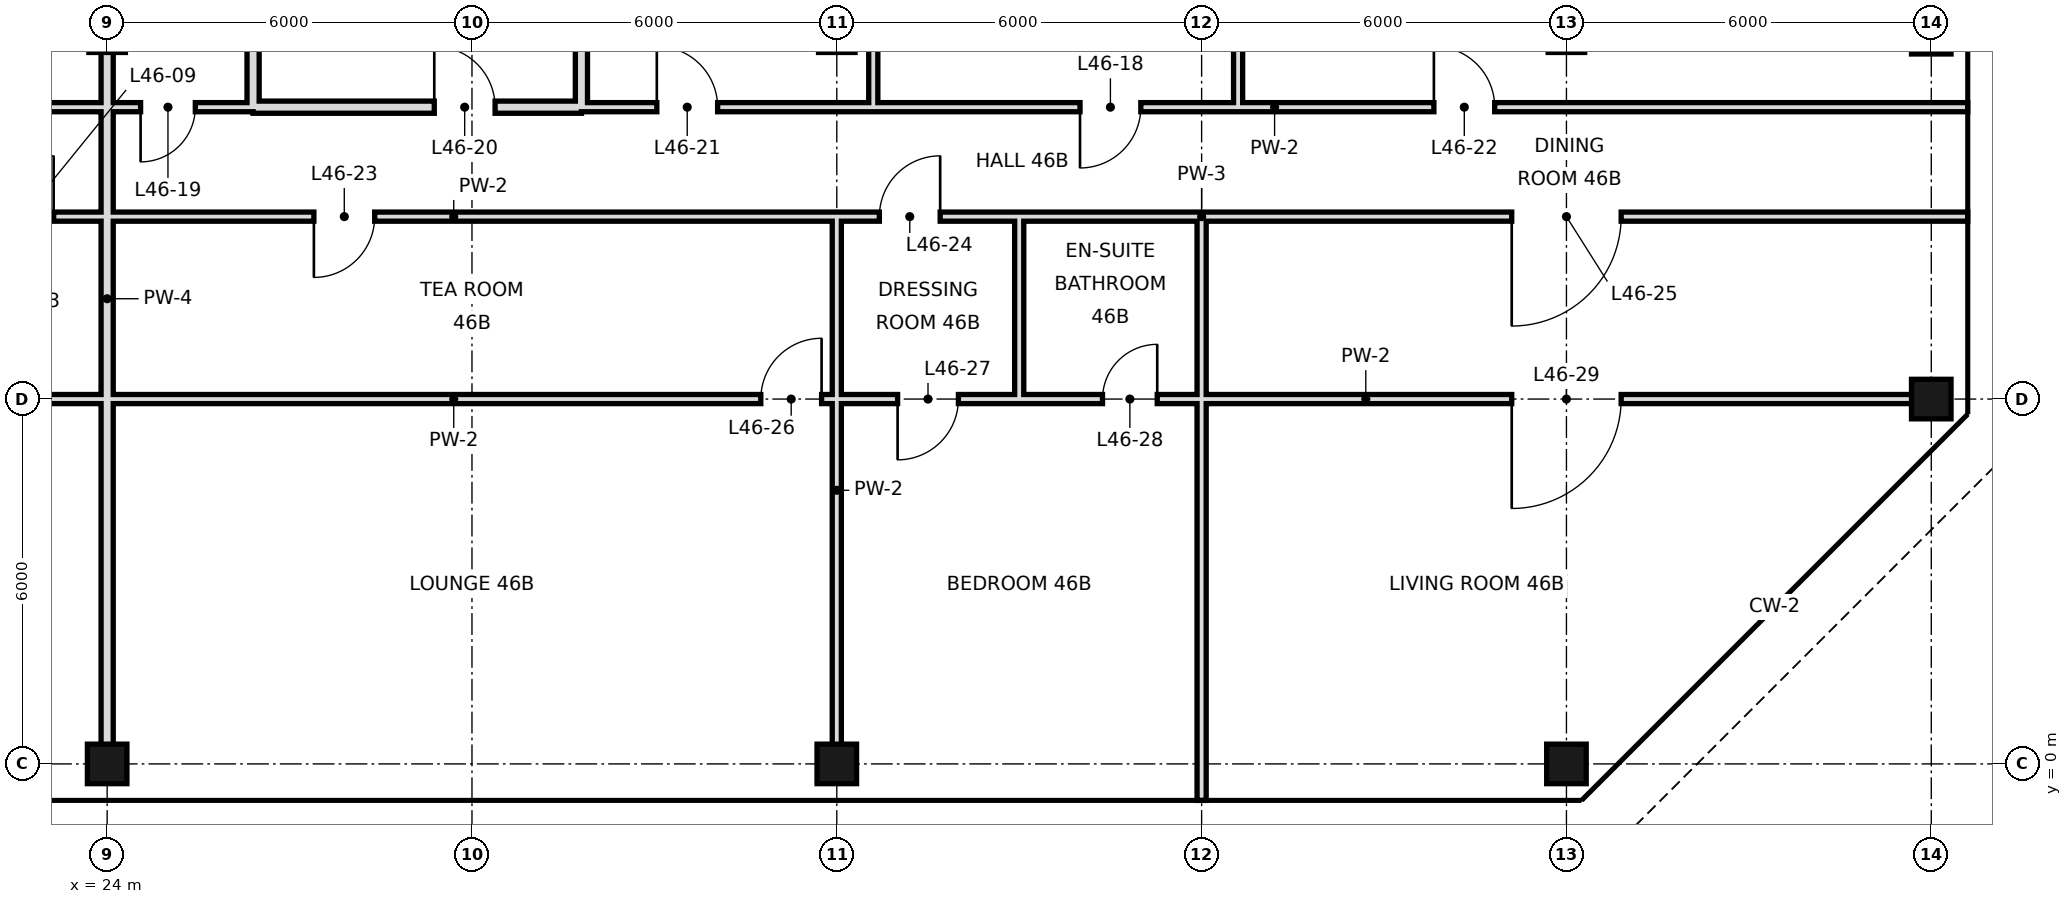
"""IFC4 building model, lengths in metres.
Left out: names, types, materials, properties, quantities, classifications, styles, units other than length and angle.
Written with IfcOpenShell. Run it as: python <this file> out.ifc"""

import sys

from ifc_helpers import new_model, si_unit, direction, frame, frame_2d, origin, origin_2d, place, context, subcontext, project, spatial, rectangle, hollow_rectangle, extrude, element, fill, save


model = new_model("IFC4")
c1 = context("Model", 3, precision=1e-05, world=origin(), true_north=direction((0.0, 1.0)))
c2 = subcontext(c1, "Body", "Model", "MODEL_VIEW")
j1 = project(units=[si_unit("LENGTHUNIT", "METRE"), si_unit("PLANEANGLEUNIT", "RADIAN")], contexts=[c1])
p1 = place(None, origin())
s1 = spatial("IfcSite", under=j1, at=p1, CompositionType="ELEMENT")
p2 = place(p1, origin())
s2 = spatial("IfcBuilding", under=s1, at=p2, CompositionType="ELEMENT")
p3 = place(p2, frame((0.0, 0.0, 199.2)))
s3 = spatial("IfcBuildingStorey", under=s2, at=p3, CompositionType="ELEMENT", Elevation=199.2)
for number, where, z_axis, x_axis in (
    (1, (24.0, 0.0, 0.0), (0.0, 0.0, 1.0), (1.0, 0.0, 0.0)),
    (2, (36.0, 0.0, 0.0), (0.0, 0.0, 1.0), (1.0, 0.0, 0.0)),
    (3, (48.0, 0.0, 0.0), (0.0, 0.0, 1.0), (1.0, 0.0, 0.0)),
    (4, (54.0, 6.0, 0.0), (0.0, 0.0, 1.0), (1.0, 0.0, 0.0)),
    (5, (54.0, 12.0, 0.0), (0.0, 0.0, 1.0), (1.0, 0.0, 0.0)),
):
    element("IfcColumn", number, at=place(p3, frame(where, z_axis=z_axis, x_axis=x_axis)), inside=s3, PredefinedType="COLUMN", context=c2, shape_type="SweptSolid", body=[
        extrude(hollow_rectangle(XDim=0.65, YDim=0.65, WallThickness=0.032, at=origin_2d()), origin(), (0.0, 0.0, 1.0), 3.6),
    ])
p4 = place(p3, frame((24.0, 0.0, 0.0), z_axis=(0.0, 0.0, 1.0), x_axis=(0.0, 1.0, 0.0)))
e6 = element("IfcWall", 6, at=p4, inside=s3, PredefinedType="SOLIDWALL", context=c2, shape_type="SweptSolid", body=[
    extrude(rectangle(XDim=15.3, YDim=0.2, at=frame_2d((7.65, 0.0))), origin(), (0.0, 0.0, 1.0), 2.72),
])
p5 = place(p3, frame((26.4, 10.8, 0.0), z_axis=(0.0, 0.0, 1.0), x_axis=(0.0, 1.0, 0.0)))
e7 = element("IfcWall", 7, at=p5, inside=s3, PredefinedType="SOLIDWALL", context=c2, shape_type="SweptSolid", body=[
    extrude(rectangle(XDim=4.5, YDim=0.2, at=frame_2d((2.25, 0.0))), origin(), (0.0, 0.0, 1.0), 2.72),
])
p6 = place(p3, frame((31.8, 10.8, 0.0), z_axis=(0.0, 0.0, 1.0), x_axis=(0.0, 1.0, 0.0)))
e8 = element("IfcWall", 8, at=p6, inside=s3, PredefinedType="SOLIDWALL", context=c2, shape_type="SweptSolid", body=[
    extrude(rectangle(XDim=4.5, YDim=0.2, at=frame_2d((2.25, 0.0))), origin(), (0.0, 0.0, 1.0), 3.42),
])
p7 = place(p3, frame((36.0, 0.0, 0.0), z_axis=(0.0, 0.0, 1.0), x_axis=(0.0, 1.0, 0.0)))
e9 = element("IfcWall", 9, at=p7, inside=s3, PredefinedType="PARTITIONING", context=c2, shape_type="SweptSolid", body=[
    extrude(rectangle(XDim=9.0, YDim=0.15, at=frame_2d((4.5, 0.0))), origin(), (0.0, 0.0, 1.0), 2.72),
])
p8 = place(p3, frame((36.6, 10.8, 0.0), z_axis=(0.0, 0.0, 1.0), x_axis=(0.0, 1.0, 0.0)))
e10 = element("IfcWall", 10, at=p8, inside=s3, PredefinedType="PARTITIONING", context=c2, shape_type="SweptSolid", body=[
    extrude(rectangle(XDim=4.5, YDim=0.15, at=frame_2d((2.25, 0.0))), origin(), (0.0, 0.0, 1.0), 3.42),
])
p9 = place(p3, frame((39.0, 6.0, 0.0), z_axis=(0.0, 0.0, 1.0), x_axis=(0.0, 1.0, 0.0)))
e11 = element("IfcWall", 11, at=p9, inside=s3, PredefinedType="PARTITIONING", context=c2, shape_type="SweptSolid", body=[
    extrude(rectangle(XDim=3.0, YDim=0.15, at=frame_2d((1.5, 0.0))), origin(), (0.0, 0.0, 1.0), 3.42),
])
p10 = place(p3, frame((42.0, -0.6, 0.0), z_axis=(0.0, 0.0, 1.0), x_axis=(0.0, 1.0, 0.0)))
e12 = element("IfcWall", 12, at=p10, inside=s3, PredefinedType="PARTITIONING", context=c2, shape_type="SweptSolid", body=[
    extrude(rectangle(XDim=6.6, YDim=0.15, at=frame_2d((3.3, 0.0))), origin(), (0.0, 0.0, 1.0), 2.72),
])
p11 = place(p3, frame((42.0, 6.0, 0.0), z_axis=(0.0, 0.0, 1.0), x_axis=(0.0, 1.0, 0.0)))
e13 = element("IfcWall", 13, at=p11, inside=s3, PredefinedType="PARTITIONING", context=c2, shape_type="SweptSolid", body=[
    extrude(rectangle(XDim=3.0, YDim=0.15, at=frame_2d((1.5, 0.0))), origin(), (0.0, 0.0, 1.0), 2.72),
])
p12 = place(p3, frame((42.6, 10.8, 0.0), z_axis=(0.0, 0.0, 1.0), x_axis=(0.0, 1.0, 0.0)))
e14 = element("IfcWall", 14, at=p12, inside=s3, PredefinedType="PARTITIONING", context=c2, shape_type="SweptSolid", body=[
    extrude(rectangle(XDim=4.5, YDim=0.15, at=frame_2d((2.25, 0.0))), origin(), (0.0, 0.0, 1.0), 3.42),
])
p13 = place(p3, frame((26.4, 10.8, 0.0), z_axis=(0.0, 0.0, 1.0), x_axis=(1.0, 0.0, 0.0)))
e15 = element("IfcWall", 15, at=p13, inside=s3, PredefinedType="SOLIDWALL", context=c2, shape_type="SweptSolid", body=[
    extrude(rectangle(XDim=5.4, YDim=0.2, at=frame_2d((2.7, 0.0))), origin(), (0.0, 0.0, 1.0), 2.72),
])
p14 = place(p13, frame((2.98, 0.0, 0.0)))
e16 = element("IfcOpeningElement", 16, at=p14, cuts=e15, PredefinedType="OPENING", context=c2, shape_type="SweptSolid", body=[
    extrude(rectangle(XDim=1.0, YDim=2.4, at=frame_2d((0.5, 1.2))), frame((0.0, 0.11, 0.0), z_axis=(0.0, -1.0, 0.0), x_axis=(1.0, 0.0, 0.0)), (0.0, 0.0, 1.0), 0.22),
])
p15 = place(p3, frame((19.2, 10.8, 0.0), z_axis=(0.0, 0.0, 1.0), x_axis=(1.0, 0.0, 0.0)))
e17 = element("IfcWall", 17, at=p15, inside=s3, PredefinedType="PARTITIONING", context=c2, shape_type="SweptSolid", body=[
    extrude(rectangle(XDim=4.8, YDim=0.15, at=frame_2d((2.4, 0.0))), origin(), (0.0, 0.0, 1.0), 3.42),
])
p16 = place(p15, frame((2.56, 0.0, 0.0)))
e18 = element("IfcOpeningElement", 18, at=p16, cuts=e17, PredefinedType="OPENING", context=c2, shape_type="SweptSolid", body=[
    extrude(rectangle(XDim=1.0, YDim=2.4, at=frame_2d((0.5, 1.2))), frame((0.0, 0.085, 0.0), z_axis=(0.0, -1.0, 0.0), x_axis=(1.0, 0.0, 0.0)), (0.0, 0.0, 1.0), 0.17),
])
p17 = place(p3, frame((31.8, 10.8, 0.0), z_axis=(0.0, 0.0, 1.0), x_axis=(1.0, 0.0, 0.0)))
e19 = element("IfcWall", 19, at=p17, inside=s3, PredefinedType="PARTITIONING", context=c2, shape_type="SweptSolid", body=[
    extrude(rectangle(XDim=22.8, YDim=0.15, at=frame_2d((11.4, 0.0))), origin(), (0.0, 0.0, 1.0), 3.42),
])
p18 = place(p17, frame((8.2, 0.0, 0.0)))
e20 = element("IfcOpeningElement", 20, at=p18, cuts=e19, PredefinedType="OPENING", context=c2, shape_type="SweptSolid", body=[
    extrude(rectangle(XDim=1.0, YDim=2.4, at=frame_2d((0.5, 1.2))), frame((0.0, 0.085, 0.0), z_axis=(0.0, -1.0, 0.0), x_axis=(1.0, 0.0, 0.0)), (0.0, 0.0, 1.0), 0.17),
])
p19 = place(p17, frame((1.24, 0.0, 0.0)))
e21 = element("IfcOpeningElement", 21, at=p19, cuts=e19, PredefinedType="OPENING", context=c2, shape_type="SweptSolid", body=[
    extrude(rectangle(XDim=1.0, YDim=2.4, at=frame_2d((0.5, 1.2))), frame((0.0, 0.085, 0.0), z_axis=(0.0, -1.0, 0.0), x_axis=(1.0, 0.0, 0.0)), (0.0, 0.0, 1.0), 0.17),
])
p20 = place(p17, frame((14.02, 0.0, 0.0)))
e22 = element("IfcOpeningElement", 22, at=p20, cuts=e19, PredefinedType="OPENING", context=c2, shape_type="SweptSolid", body=[
    extrude(rectangle(XDim=1.0, YDim=2.4, at=frame_2d((0.5, 1.2))), frame((0.0, 0.085, 0.0), z_axis=(0.0, -1.0, 0.0), x_axis=(1.0, 0.0, 0.0)), (0.0, 0.0, 1.0), 0.17),
])
p21 = place(p3, frame((24.0, 10.8, 0.0), z_axis=(0.0, 0.0, 1.0), x_axis=(1.0, 0.0, 0.0)))
e23 = element("IfcWall", 23, at=p21, inside=s3, PredefinedType="PARTITIONING", context=c2, shape_type="SweptSolid", body=[
    extrude(rectangle(XDim=2.4, YDim=0.15, at=frame_2d((1.2, 0.0))), origin(), (0.0, 0.0, 1.0), 3.42),
])
p22 = place(p21, frame((0.55, 0.0, 0.0)))
e24 = element("IfcOpeningElement", 24, at=p22, cuts=e23, PredefinedType="OPENING", context=c2, shape_type="SweptSolid", body=[
    extrude(rectangle(XDim=0.9, YDim=2.4, at=frame_2d((0.45, 1.2))), frame((0.0, 0.085, 0.0), z_axis=(0.0, -1.0, 0.0), x_axis=(1.0, 0.0, 0.0)), (0.0, 0.0, 1.0), 0.17),
])
p23 = place(p3, frame((20.4, 6.0, 0.0), z_axis=(0.0, 0.0, 1.0), x_axis=(1.0, 0.0, 0.0)))
e25 = element("IfcWall", 25, at=p23, inside=s3, PredefinedType="PARTITIONING", context=c2, shape_type="SweptSolid", body=[
    extrude(rectangle(XDim=18.6, YDim=0.15, at=frame_2d((9.3, 0.0))), origin(), (0.0, 0.0, 1.0), 2.97),
])
p24 = place(p23, frame((0.25, 0.0, 0.0)))
e26 = element("IfcOpeningElement", 26, at=p24, cuts=e25, PredefinedType="OPENING", context=c2, shape_type="SweptSolid", body=[
    extrude(rectangle(XDim=1.0, YDim=2.4, at=frame_2d((0.5, 1.2))), frame((0.0, 0.085, 0.0), z_axis=(0.0, -1.0, 0.0), x_axis=(1.0, 0.0, 0.0)), (0.0, 0.0, 1.0), 0.17),
])
p25 = place(p23, frame((14.35, 0.0, 0.0)))
e27 = element("IfcOpeningElement", 27, at=p25, cuts=e25, PredefinedType="OPENING", context=c2, shape_type="SweptSolid", body=[
    extrude(rectangle(XDim=1.0, YDim=2.4, at=frame_2d((0.5, 1.2))), frame((0.0, 0.085, 0.0), z_axis=(0.0, -1.0, 0.0), x_axis=(1.0, 0.0, 0.0)), (0.0, 0.0, 1.0), 0.17),
])
p26 = place(p23, frame((16.6, 0.0, 0.0)))
e28 = element("IfcOpeningElement", 28, at=p26, cuts=e25, PredefinedType="OPENING", context=c2, shape_type="SweptSolid", body=[
    extrude(rectangle(XDim=1.0, YDim=2.4, at=frame_2d((0.5, 1.2))), frame((0.0, 0.085, 0.0), z_axis=(0.0, -1.0, 0.0), x_axis=(1.0, 0.0, 0.0)), (0.0, 0.0, 1.0), 0.17),
])
p27 = place(p3, frame((42.0, 6.0, 0.0), z_axis=(0.0, 0.0, 1.0), x_axis=(1.0, 0.0, 0.0)))
e29 = element("IfcWall", 29, at=p27, inside=s3, PredefinedType="PARTITIONING", context=c2, shape_type="SweptSolid", body=[
    extrude(rectangle(XDim=12.0, YDim=0.15, at=frame_2d((6.0, 0.0))), origin(), (0.0, 0.0, 1.0), 2.97),
])
p28 = place(p27, frame((5.1, 0.0, 0.0)))
e30 = element("IfcOpeningElement", 30, at=p28, cuts=e29, PredefinedType="OPENING", context=c2, shape_type="SweptSolid", body=[
    extrude(rectangle(XDim=1.8, YDim=2.4, at=frame_2d((0.9, 1.2))), frame((0.0, 0.085, 0.0), z_axis=(0.0, -1.0, 0.0), x_axis=(1.0, 0.0, 0.0)), (0.0, 0.0, 1.0), 0.17),
])
p29 = place(p3, frame((39.0, 6.0, 0.0), z_axis=(0.0, 0.0, 1.0), x_axis=(1.0, 0.0, 0.0)))
e31 = element("IfcWall", 31, at=p29, inside=s3, PredefinedType="PARTITIONING", context=c2, shape_type="SweptSolid", body=[
    extrude(rectangle(XDim=3.0, YDim=0.15, at=frame_2d((1.5, 0.0))), origin(), (0.0, 0.0, 1.0), 2.97),
])
p30 = place(p29, frame((1.37, 0.0, 0.0)))
e32 = element("IfcOpeningElement", 32, at=p30, cuts=e31, PredefinedType="OPENING", context=c2, shape_type="SweptSolid", body=[
    extrude(rectangle(XDim=0.9, YDim=2.4, at=frame_2d((0.45, 1.2))), frame((0.0, 0.085, 0.0), z_axis=(0.0, -1.0, 0.0), x_axis=(1.0, 0.0, 0.0)), (0.0, 0.0, 1.0), 0.17),
])
p31 = place(p3, frame((20.4, 9.0, 0.0), z_axis=(0.0, 0.0, 1.0), x_axis=(1.0, 0.0, 0.0)))
e33 = element("IfcWall", 33, at=p31, inside=s3, PredefinedType="PARTITIONING", context=c2, shape_type="SweptSolid", body=[
    extrude(rectangle(XDim=18.6, YDim=0.15, at=frame_2d((9.3, 0.0))), origin(), (0.0, 0.0, 1.0), 3.42),
])
p32 = place(p31, frame((1.72, 0.0, 0.0)))
e34 = element("IfcOpeningElement", 34, at=p32, cuts=e33, PredefinedType="OPENING", context=c2, shape_type="SweptSolid", body=[
    extrude(rectangle(XDim=1.0, YDim=2.4, at=frame_2d((0.5, 1.2))), frame((0.0, 0.085, 0.0), z_axis=(0.0, -1.0, 0.0), x_axis=(1.0, 0.0, 0.0)), (0.0, 0.0, 1.0), 0.17),
])
p33 = place(p31, frame((7.0, 0.0, 0.0)))
e35 = element("IfcOpeningElement", 35, at=p33, cuts=e33, PredefinedType="OPENING", context=c2, shape_type="SweptSolid", body=[
    extrude(rectangle(XDim=1.0, YDim=2.4, at=frame_2d((0.5, 1.2))), frame((0.0, 0.085, 0.0), z_axis=(0.0, -1.0, 0.0), x_axis=(1.0, 0.0, 0.0)), (0.0, 0.0, 1.0), 0.17),
])
p34 = place(p31, frame((16.3, 0.0, 0.0)))
e36 = element("IfcOpeningElement", 36, at=p34, cuts=e33, PredefinedType="OPENING", context=c2, shape_type="SweptSolid", body=[
    extrude(rectangle(XDim=1.0, YDim=2.4, at=frame_2d((0.5, 1.2))), frame((0.0, 0.085, 0.0), z_axis=(0.0, -1.0, 0.0), x_axis=(1.0, 0.0, 0.0)), (0.0, 0.0, 1.0), 0.17),
])
p35 = place(p3, frame((42.0, 9.0, 0.0), z_axis=(0.0, 0.0, 1.0), x_axis=(1.0, 0.0, 0.0)))
e37 = element("IfcWall", 37, at=p35, inside=s3, PredefinedType="PARTITIONING", context=c2, shape_type="SweptSolid", body=[
    extrude(rectangle(XDim=12.6, YDim=0.15, at=frame_2d((6.3, 0.0))), origin(), (0.0, 0.0, 1.0), 3.42),
])
p36 = place(p35, frame((5.1, 0.0, 0.0)))
e38 = element("IfcOpeningElement", 38, at=p36, cuts=e37, PredefinedType="OPENING", context=c2, shape_type="SweptSolid", body=[
    extrude(rectangle(XDim=1.8, YDim=2.4, at=frame_2d((0.9, 1.2))), frame((0.0, 0.085, 0.0), z_axis=(0.0, -1.0, 0.0), x_axis=(1.0, 0.0, 0.0)), (0.0, 0.0, 1.0), 0.17),
])
p37 = place(p3, frame((39.0, 9.0, 0.0), z_axis=(0.0, 0.0, 1.0), x_axis=(1.0, 0.0, 0.0)))
e39 = element("IfcWall", 39, at=p37, inside=s3, PredefinedType="PARTITIONING", context=c2, shape_type="SweptSolid", body=[
    extrude(rectangle(XDim=3.0, YDim=0.15, at=frame_2d((1.5, 0.0))), origin(), (0.0, 0.0, 1.0), 3.42),
])
p38 = place(p32, frame((1.0, 0.0, 0.0), z_axis=(0.0, 0.0, 1.0), x_axis=(-1.0, 0.0, 0.0)))
e40 = element("IfcDoor", 40, at=p38, inside=s3, OperationType="SINGLE_SWING_LEFT", PredefinedType="DOOR", context=c2, shape_type="SweptSolid", body=[
    extrude(rectangle(XDim=1.0, YDim=2.4, at=frame_2d((0.5, 1.2))), frame((0.0, 0.025, 0.0), z_axis=(0.0, -1.0, 0.0), x_axis=(1.0, 0.0, 0.0)), (0.0, 0.0, 1.0), 0.05),
])
fill(e34, e40)
p39 = place(p18, frame((1.0, 0.0, 0.0), z_axis=(0.0, 0.0, 1.0), x_axis=(-1.0, 0.0, 0.0)))
e41 = element("IfcDoor", 41, at=p39, inside=s3, OperationType="SINGLE_SWING_RIGHT", PredefinedType="DOOR", context=c2, shape_type="SweptSolid", body=[
    extrude(rectangle(XDim=1.0, YDim=2.4, at=frame_2d((0.5, 1.2))), frame((0.0, 0.025, 0.0), z_axis=(0.0, -1.0, 0.0), x_axis=(1.0, 0.0, 0.0)), (0.0, 0.0, 1.0), 0.05),
])
fill(e20, e41)
p40 = place(p22, frame((0.9, 0.0, 0.0), z_axis=(0.0, 0.0, 1.0), x_axis=(-1.0, 0.0, 0.0)))
e42 = element("IfcDoor", 42, at=p40, inside=s3, OperationType="SINGLE_SWING_RIGHT", PredefinedType="DOOR", context=c2, shape_type="SweptSolid", body=[
    extrude(rectangle(XDim=0.9, YDim=2.4, at=frame_2d((0.45, 1.2))), frame((0.0, 0.025, 0.0), z_axis=(0.0, -1.0, 0.0), x_axis=(1.0, 0.0, 0.0)), (0.0, 0.0, 1.0), 0.05),
])
fill(e24, e42)
p41 = place(p14, origin())
e43 = element("IfcDoor", 43, at=p41, inside=s3, OperationType="SINGLE_SWING_LEFT", PredefinedType="DOOR", context=c2, shape_type="SweptSolid", body=[
    extrude(rectangle(XDim=1.0, YDim=2.4, at=frame_2d((0.5, 1.2))), frame((0.0, 0.025, 0.0), z_axis=(0.0, -1.0, 0.0), x_axis=(1.0, 0.0, 0.0)), (0.0, 0.0, 1.0), 0.05),
])
fill(e16, e43)
p42 = place(p19, origin())
e44 = element("IfcDoor", 44, at=p42, inside=s3, OperationType="SINGLE_SWING_LEFT", PredefinedType="DOOR", context=c2, shape_type="SweptSolid", body=[
    extrude(rectangle(XDim=1.0, YDim=2.4, at=frame_2d((0.5, 1.2))), frame((0.0, 0.025, 0.0), z_axis=(0.0, -1.0, 0.0), x_axis=(1.0, 0.0, 0.0)), (0.0, 0.0, 1.0), 0.05),
])
fill(e21, e44)
p43 = place(p20, origin())
e45 = element("IfcDoor", 45, at=p43, inside=s3, OperationType="SINGLE_SWING_LEFT", PredefinedType="DOOR", context=c2, shape_type="SweptSolid", body=[
    extrude(rectangle(XDim=1.0, YDim=2.4, at=frame_2d((0.5, 1.2))), frame((0.0, 0.025, 0.0), z_axis=(0.0, -1.0, 0.0), x_axis=(1.0, 0.0, 0.0)), (0.0, 0.0, 1.0), 0.05),
])
fill(e22, e45)
p44 = place(p33, frame((1.0, 0.0, 0.0), z_axis=(0.0, 0.0, 1.0), x_axis=(-1.0, 0.0, 0.0)))
e46 = element("IfcDoor", 46, at=p44, inside=s3, OperationType="SINGLE_SWING_RIGHT", PredefinedType="DOOR", context=c2, shape_type="SweptSolid", body=[
    extrude(rectangle(XDim=1.0, YDim=2.4, at=frame_2d((0.5, 1.2))), frame((0.0, 0.025, 0.0), z_axis=(0.0, -1.0, 0.0), x_axis=(1.0, 0.0, 0.0)), (0.0, 0.0, 1.0), 0.05),
])
fill(e35, e46)
p45 = place(p34, frame((1.0, 0.0, 0.0), z_axis=(0.0, 0.0, 1.0), x_axis=(-1.0, 0.0, 0.0)))
e47 = element("IfcDoor", 47, at=p45, inside=s3, OperationType="SINGLE_SWING_LEFT", PredefinedType="DOOR", context=c2, shape_type="SweptSolid", body=[
    extrude(rectangle(XDim=1.0, YDim=2.4, at=frame_2d((0.5, 1.2))), frame((0.0, 0.025, 0.0), z_axis=(0.0, -1.0, 0.0), x_axis=(1.0, 0.0, 0.0)), (0.0, 0.0, 1.0), 0.05),
])
fill(e36, e47)
p46 = place(p36, frame((1.8, 0.0, 0.0), z_axis=(0.0, 0.0, 1.0), x_axis=(-1.0, 0.0, 0.0)))
e48 = element("IfcDoor", 48, at=p46, inside=s3, OperationType="SINGLE_SWING_RIGHT", PredefinedType="DOOR", context=c2, shape_type="SweptSolid", body=[
    extrude(rectangle(XDim=1.8, YDim=2.4, at=frame_2d((0.9, 1.2))), frame((0.0, 0.025, 0.0), z_axis=(0.0, -1.0, 0.0), x_axis=(1.0, 0.0, 0.0)), (0.0, 0.0, 1.0), 0.05),
])
fill(e38, e48)
p47 = place(p25, frame((1.0, 0.0, 0.0), z_axis=(0.0, 0.0, 1.0), x_axis=(-1.0, 0.0, 0.0)))
e49 = element("IfcDoor", 49, at=p47, inside=s3, OperationType="SINGLE_SWING_LEFT", PredefinedType="DOOR", context=c2, shape_type="SweptSolid", body=[
    extrude(rectangle(XDim=1.0, YDim=2.4, at=frame_2d((0.5, 1.2))), frame((0.0, 0.025, 0.0), z_axis=(0.0, -1.0, 0.0), x_axis=(1.0, 0.0, 0.0)), (0.0, 0.0, 1.0), 0.05),
])
fill(e27, e49)
p48 = place(p26, frame((1.0, 0.0, 0.0), z_axis=(0.0, 0.0, 1.0), x_axis=(-1.0, 0.0, 0.0)))
e50 = element("IfcDoor", 50, at=p48, inside=s3, OperationType="SINGLE_SWING_RIGHT", PredefinedType="DOOR", context=c2, shape_type="SweptSolid", body=[
    extrude(rectangle(XDim=1.0, YDim=2.4, at=frame_2d((0.5, 1.2))), frame((0.0, 0.025, 0.0), z_axis=(0.0, -1.0, 0.0), x_axis=(1.0, 0.0, 0.0)), (0.0, 0.0, 1.0), 0.05),
])
fill(e28, e50)
p49 = place(p30, frame((0.9, 0.0, 0.0), z_axis=(0.0, 0.0, 1.0), x_axis=(-1.0, 0.0, 0.0)))
e51 = element("IfcDoor", 51, at=p49, inside=s3, OperationType="SINGLE_SWING_LEFT", PredefinedType="DOOR", context=c2, shape_type="SweptSolid", body=[
    extrude(rectangle(XDim=0.9, YDim=2.4, at=frame_2d((0.45, 1.2))), frame((0.0, 0.025, 0.0), z_axis=(0.0, -1.0, 0.0), x_axis=(1.0, 0.0, 0.0)), (0.0, 0.0, 1.0), 0.05),
])
fill(e32, e51)
p50 = place(p28, frame((1.8, 0.0, 0.0), z_axis=(0.0, 0.0, 1.0), x_axis=(-1.0, 0.0, 0.0)))
e52 = element("IfcDoor", 52, at=p50, inside=s3, OperationType="SINGLE_SWING_RIGHT", PredefinedType="DOOR", context=c2, shape_type="SweptSolid", body=[
    extrude(rectangle(XDim=1.8, YDim=2.4, at=frame_2d((0.9, 1.2))), frame((0.0, 0.025, 0.0), z_axis=(0.0, -1.0, 0.0), x_axis=(1.0, 0.0, 0.0)), (0.0, 0.0, 1.0), 0.05),
])
fill(e30, e52)
save(model, sys.argv[1])
